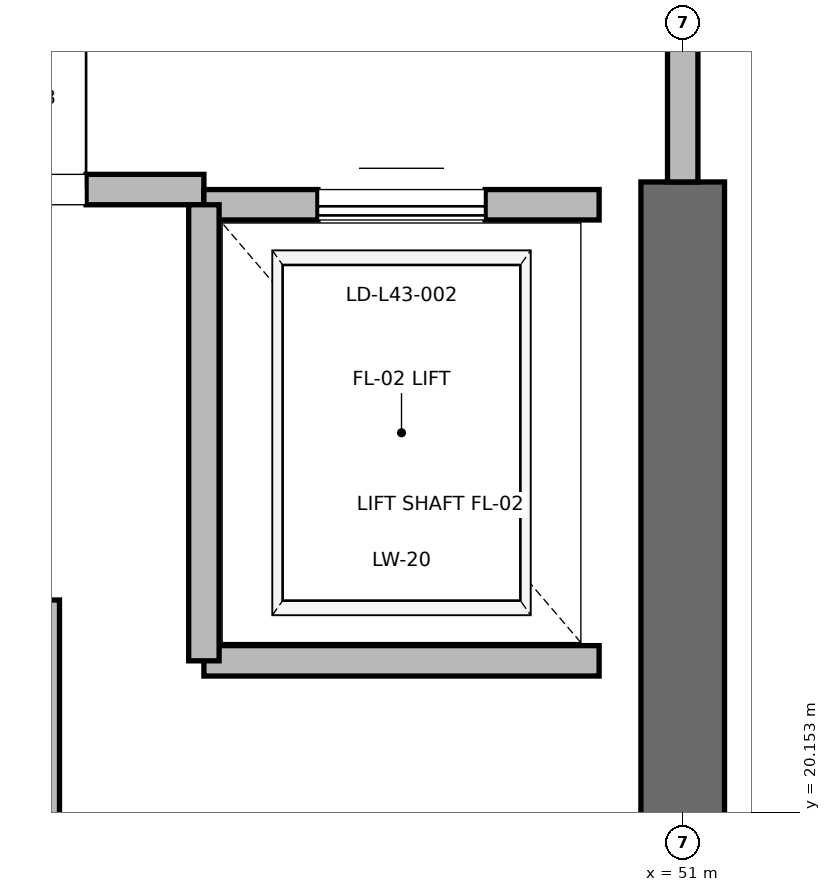
"""IFC4 building model, lengths in metres.
Left out: names, types, materials, properties, quantities, classifications, styles, units other than length and angle.
Written with IfcOpenShell. Run it as: python <this file> out.ifc"""

import sys

from ifc_helpers import new_model, si_unit, direction, frame, frame_2d, origin, place, context, subcontext, project, spatial, rectangle, extrude, element, fill, save


model = new_model("IFC4")
c1 = context("Model", 3, precision=1e-05, world=origin(), true_north=direction((0.0, 1.0)))
c2 = subcontext(c1, "Body", "Model", "MODEL_VIEW")
j1 = project(units=[si_unit("LENGTHUNIT", "METRE"), si_unit("PLANEANGLEUNIT", "RADIAN")], contexts=[c1])
p1 = place(None, origin())
s1 = spatial("IfcSite", under=j1, at=p1, CompositionType="ELEMENT")
p2 = place(p1, origin())
s2 = spatial("IfcBuilding", under=s1, at=p2, CompositionType="ELEMENT")
p3 = place(p2, frame((0.0, 0.0, 184.4)))
s3 = spatial("IfcBuildingStorey", under=s2, at=p3, CompositionType="ELEMENT", Elevation=184.4)
p4 = place(p3, frame((51.0, 18.5, 0.0), z_axis=(0.0, 0.0, 1.0), x_axis=(0.0, 1.0, 0.0)))
e1 = element("IfcWall", 1, at=p4, inside=s3, PredefinedType="SHEAR", context=c2, shape_type="SweptSolid", body=[
    extrude(rectangle(XDim=5.8, YDim=0.55, at=frame_2d((2.9, 0.0))), origin(), (0.0, 0.0, 1.0), 4.7),
])
p5 = place(p3, frame((45.15, 24.25, 0.0), z_axis=(0.0, 0.0, 1.0), x_axis=(1.0, 0.0, 0.0)))
e2 = element("IfcWall", 2, at=p5, inside=s3, PredefinedType="PARTITIONING", context=c2, shape_type="SweptSolid", body=[
    extrude(rectangle(XDim=2.7, YDim=0.2, at=frame_2d((1.35, 0.0))), origin(), (0.0, 0.0, 1.0), 4.7),
])
p6 = place(p5, frame((0.775, 0.0, 0.0)))
e3 = element("IfcOpeningElement", 3, at=p6, cuts=e2, PredefinedType="OPENING", context=c2, shape_type="SweptSolid", body=[
    extrude(rectangle(XDim=1.15, YDim=2.2, at=frame_2d((0.575, 1.1))), frame((0.0, 0.1, 0.0), z_axis=(0.0, -1.0, 0.0), x_axis=(1.0, 0.0, 0.0)), (0.0, 0.0, 1.0), 0.2),
])
p7 = place(p3, frame((51.0, 24.3, 0.0), z_axis=(0.0, 0.0, 1.0), x_axis=(0.0, 1.0, 0.0)))
e4 = element("IfcWall", 4, at=p7, inside=s3, PredefinedType="PARTITIONING", context=c2, shape_type="SweptSolid", body=[
    extrude(rectangle(XDim=3.4, YDim=0.2, at=frame_2d((1.7, 0.0))), origin(), (0.0, 0.0, 1.0), 3.68),
])
p8 = place(p7, frame((1.125, 0.0, 0.0)))
e5 = element("IfcOpeningElement", 5, at=p8, cuts=e4, PredefinedType="OPENING", context=c2, shape_type="SweptSolid", body=[
    extrude(rectangle(XDim=1.15, YDim=2.2, at=frame_2d((0.575, 1.1))), frame((0.0, 0.1, 0.0), z_axis=(0.0, -1.0, 0.0), x_axis=(1.0, 0.0, 0.0)), (0.0, 0.0, 1.0), 0.2),
])
p9 = place(p3, frame((47.85, 21.15, 0.0), z_axis=(0.0, 0.0, 1.0), x_axis=(1.0, 0.0, 0.0)))
e6 = element("IfcWall", 6, at=p9, inside=s3, PredefinedType="SOLIDWALL", context=c2, shape_type="SweptSolid", body=[
    extrude(rectangle(XDim=2.6, YDim=0.2, at=frame_2d((1.3, 0.0))), origin(), (0.0, 0.0, 1.0), 4.7),
])
p10 = place(p3, frame((50.45, 24.15, 0.0), z_axis=(0.0, 0.0, 1.0), x_axis=(-1.0, 0.0, 0.0)))
e7 = element("IfcWall", 7, at=p10, inside=s3, PredefinedType="SOLIDWALL", context=c2, shape_type="SweptSolid", body=[
    extrude(rectangle(XDim=2.6, YDim=0.2, at=frame_2d((1.3, 0.0))), origin(), (0.0, 0.0, 1.0), 3.68),
])
p11 = place(p10, frame((0.75, 0.0, 0.0)))
e8 = element("IfcOpeningElement", 8, at=p11, cuts=e7, PredefinedType="OPENING", context=c2, shape_type="SweptSolid", body=[
    extrude(rectangle(XDim=1.1, YDim=2.2, at=frame_2d((0.55, 1.1))), frame((0.0, 0.1, 0.0), z_axis=(0.0, -1.0, 0.0), x_axis=(1.0, 0.0, 0.0)), (0.0, 0.0, 1.0), 0.2),
])
p12 = place(p3, frame((47.85, 24.15, 0.0), z_axis=(0.0, 0.0, 1.0), x_axis=(0.0, -1.0, 0.0)))
e9 = element("IfcWall", 9, at=p12, inside=s3, PredefinedType="SOLIDWALL", context=c2, shape_type="SweptSolid", body=[
    extrude(rectangle(XDim=3.0, YDim=0.2, at=frame_2d((1.5, 0.0))), origin(), (0.0, 0.0, 1.0), 4.7),
])
p13 = place(p3, frame((46.8, 18.95, 0.0), z_axis=(0.0, 0.0, 1.0), x_axis=(0.0, 1.0, 0.0)))
e10 = element("IfcWall", 10, at=p13, inside=s3, PredefinedType="SOLIDWALL", context=c2, shape_type="SweptSolid", body=[
    extrude(rectangle(XDim=2.6, YDim=0.2, at=frame_2d((1.3, 0.0))), origin(), (0.0, 0.0, 1.0), 4.7),
])
p14 = place(p6, origin())
e11 = element("IfcDoor", 11, at=p14, inside=s3, OperationType="SINGLE_SWING_RIGHT", PredefinedType="DOOR", context=c2, shape_type="SweptSolid", body=[
    extrude(rectangle(XDim=1.15, YDim=2.2, at=frame_2d((0.575, 1.1))), frame((0.0, 0.025, 0.0), z_axis=(0.0, -1.0, 0.0), x_axis=(1.0, 0.0, 0.0)), (0.0, 0.0, 1.0), 0.05),
])
fill(e3, e11)
p15 = place(p11, origin())
e12 = element("IfcDoor", 12, at=p15, inside=s3, OperationType="SLIDING_TO_RIGHT", PredefinedType="DOOR", context=c2, shape_type="SweptSolid", body=[
    extrude(rectangle(XDim=1.1, YDim=2.2, at=frame_2d((0.55, 1.1))), frame((0.0, 0.025, 0.0), z_axis=(0.0, -1.0, 0.0), x_axis=(1.0, 0.0, 0.0)), (0.0, 0.0, 1.0), 0.05),
])
fill(e8, e12)
save(model, sys.argv[1])
